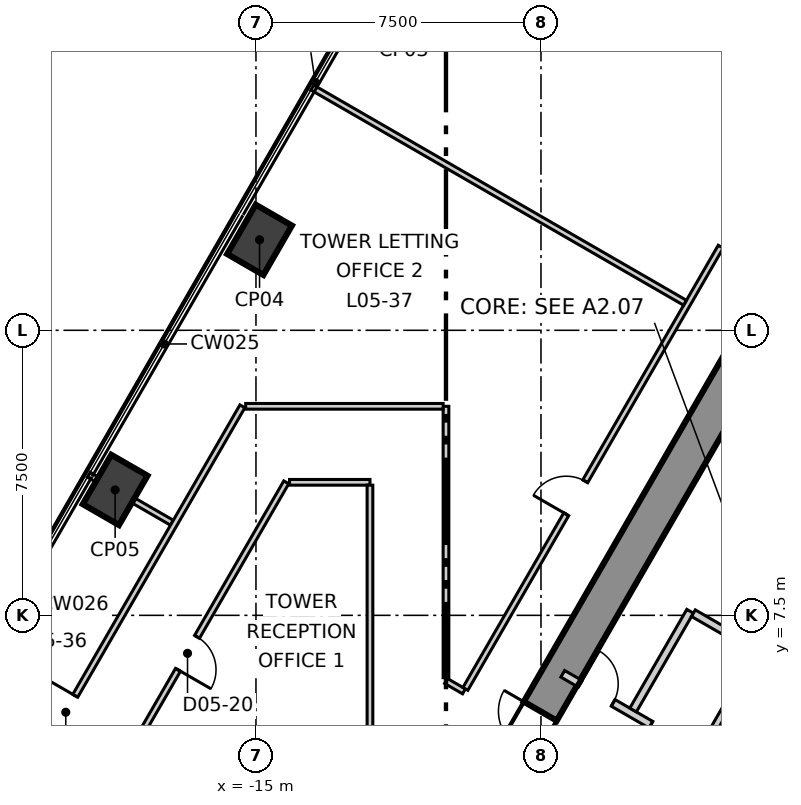
"""IFC4 building model, lengths in metres.
Left out: names, types, materials, properties, quantities, classifications, styles, units other than length and angle.
Written with IfcOpenShell. Run it as: python <this file> out.ifc"""

import sys

from ifc_helpers import new_model, si_unit, direction, frame, frame_2d, origin, origin_2d, place, context, subcontext, project, spatial, polyline, rectangle, outline, extrude, element, fill, save


model = new_model("IFC4")
c1 = context("Model", 3, precision=1e-05, world=origin(), true_north=direction((0.0, 1.0)))
c2 = subcontext(c1, "Body", "Model", "MODEL_VIEW")
j1 = project(units=[si_unit("LENGTHUNIT", "METRE"), si_unit("PLANEANGLEUNIT", "RADIAN")], contexts=[c1])
p1 = place(None, origin())
s1 = spatial("IfcSite", under=j1, at=p1, CompositionType="ELEMENT")
p2 = place(p1, origin())
s2 = spatial("IfcBuilding", under=s1, at=p2, CompositionType="ELEMENT")
p3 = place(p2, frame((0.0, 0.0, 30.3)))
s3 = spatial("IfcBuildingStorey", under=s2, at=p3, CompositionType="ELEMENT", Elevation=30.3)
p4 = place(p3, frame((-1.617, 15.2, -0.4), z_axis=(0.0, 0.0, 1.0), x_axis=(-0.499992141631, -0.866029940768, 0.0)))
e1 = element("IfcWall", 1, at=p4, inside=s3, PredefinedType="SHEAR", context=c2, shape_type="SweptSolid", body=[
    extrude(outline(polyline([(-0.289, -0.499), (1.656, -0.499), (3.601, -0.499), (5.547, -0.499), (7.492, -0.499), (9.437, -0.5), (11.382, -0.5), (13.328, -0.5), (15.273, -0.5), (17.218, -0.5), (19.163, -0.5), (21.109, -0.5), (23.054, -0.5), (24.999, -0.5), (24.422, 0.5), (22.566, 0.5), (20.709, 0.5), (18.853, 0.5), (16.997, 0.5), (15.14, 0.5), (13.284, 0.5), (11.427, 0.5), (9.571, 0.5), (7.715, 0.5), (5.858, 0.5), (4.002, 0.5), (2.146, 0.5), (0.289, 0.5), (-0.289, -0.499)])), origin(), (0.0, 0.0, 1.0), 5.1),
])
p5 = place(p4, frame((11.805, 0.0, 0.4)))
e2 = element("IfcOpeningElement", 2, at=p5, cuts=e1, PredefinedType="OPENING", context=c2, shape_type="SweptSolid", body=[
    extrude(rectangle(XDim=1.1, YDim=2.1, at=frame_2d((0.55, 1.05))), frame((0.0, 0.51, 0.0), z_axis=(0.0, -1.0, 0.0), x_axis=(1.0, 0.0, 0.0)), (0.0, 0.0, 1.0), 1.02),
])
for number, where, z_axis, x_axis in (
    (3, (-14.906, 17.381, -0.4), (0.0, 0.0, 1.0), (0.5, 0.866, 0.0)),
    (4, (-18.706, 10.8, -0.4), (0.0, 0.0, 1.0), (0.5, 0.866, 0.0)),
):
    element("IfcColumn", number, at=place(p3, frame(where, z_axis=z_axis, x_axis=x_axis)), inside=s3, PredefinedType="COLUMN", context=c2, shape_type="SweptSolid", body=[
        extrude(rectangle(XDim=1.5, YDim=1.1, at=origin_2d()), origin(), (0.0, 0.0, 1.0), 5.1),
    ])
p6 = place(p3, frame((-19.399, 11.2, 0.0), z_axis=(0.0, 0.0, 1.0), x_axis=(0.865979509711, -0.500079482444, 0.0)))
e5 = element("IfcWall", 5, at=p6, inside=s3, PredefinedType="PARTITIONING", context=c2, shape_type="SweptSolid", body=[
    extrude(rectangle(XDim=2.525, YDim=0.15, at=frame_2d((1.263, 0.0))), origin(), (0.0, 0.0, 1.0), 4.2),
])
p7 = place(p3, frame((-10.0, 5.773, 0.0), z_axis=(0.0, 0.0, 1.0), x_axis=(0.866645846342, -0.498923818852, 0.0)))
e6 = element("IfcWall", 6, at=p7, inside=s3, PredefinedType="PARTITIONING", context=c2, shape_type="SweptSolid", body=[
    extrude(rectangle(XDim=0.547, YDim=0.15, at=frame_2d((0.273, 0.0))), origin(), (0.0, 0.0, 1.0), 4.2),
])
p8 = place(p3, frame((-22.863, 0.0, 0.0), z_axis=(0.0, 0.0, 1.0), x_axis=(0.500027479704, 0.866009537788, 0.0)))
e7 = element("IfcWall", 7, at=p8, inside=s3, PredefinedType="PARTITIONING", context=c2, shape_type="SweptSolid", body=[
    extrude(rectangle(XDim=15.011, YDim=0.15, at=frame_2d((7.506, 0.0))), origin(), (0.0, 0.0, 1.0), 4.7),
])
p9 = place(p8, frame((5.216, 0.0, 0.0)))
e8 = element("IfcOpeningElement", 8, at=p9, cuts=e7, PredefinedType="OPENING", context=c2, shape_type="SweptSolid", body=[
    extrude(rectangle(XDim=1.0, YDim=2.1, at=frame_2d((0.5, 1.05))), frame((0.0, 0.085, 0.0), z_axis=(0.0, -1.0, 0.0), x_axis=(1.0, 0.0, 0.0)), (0.0, 0.0, 1.0), 0.17),
])
p10 = place(p3, frame((-9.489, 5.565, 0.0), z_axis=(0.0, 0.0, 1.0), x_axis=(0.500030231307, 0.866007949028, 0.0)))
e9 = element("IfcWall", 9, at=p10, inside=s3, PredefinedType="PARTITIONING", context=c2, shape_type="SweptSolid", body=[
    extrude(rectangle(XDim=13.435, YDim=0.15, at=frame_2d((6.718, 0.0))), origin(), (0.0, 0.0, 1.0), 4.7),
])
p11 = place(p10, frame((5.307, 0.0, 0.0)))
e10 = element("IfcOpeningElement", 10, at=p11, cuts=e9, PredefinedType="OPENING", context=c2, shape_type="SweptSolid", body=[
    extrude(rectangle(XDim=1.0, YDim=2.1, at=frame_2d((0.5, 1.05))), frame((0.0, 0.085, 0.0), z_axis=(0.0, -1.0, 0.0), x_axis=(1.0, 0.0, 0.0)), (0.0, 0.0, 1.0), 0.17),
])
p12 = place(p3, frame((-10.0, 5.86, 0.0), z_axis=(0.0, 0.0, 1.0), x_axis=(0.0, 1.0, 0.0)))
e11 = element("IfcWall", 11, at=p12, inside=s3, PredefinedType="PARTITIONING", context=c2, shape_type="SweptSolid", body=[
    extrude(rectangle(XDim=7.14, YDim=0.15, at=frame_2d((3.57, 0.0))), origin(), (0.0, 0.0, 1.0), 4.7),
])
p13 = place(p3, frame((-15.271, 13.0, 0.0), z_axis=(0.0, 0.0, 1.0), x_axis=(1.0, 0.0, 0.0)))
e12 = element("IfcWall", 12, at=p13, inside=s3, PredefinedType="PARTITIONING", context=c2, shape_type="SweptSolid", body=[
    extrude(rectangle(XDim=5.196, YDim=0.15, at=frame_2d((2.598, 0.0))), origin(), (0.0, 0.0, 1.0), 4.7),
])
p14 = place(p3, frame((-13.517, 21.387, 0.0), z_axis=(0.0, 0.0, 1.0), x_axis=(0.866036235619, -0.499981238243, 0.0)))
e13 = element("IfcWall", 13, at=p14, inside=s3, PredefinedType="PARTITIONING", context=c2, shape_type="SweptSolid", body=[
    extrude(rectangle(XDim=11.324, YDim=0.15, at=frame_2d((5.662, 0.0))), origin(), (0.0, 0.0, 1.0), 4.7),
])
p15 = place(p3, frame((-7.635, 31.575, 0.0), z_axis=(0.0, 0.0, 1.0), x_axis=(0.866010527476, -0.500025765638, 0.0)))
e14 = element("IfcWall", 14, at=p15, inside=s3, PredefinedType="PARTITIONING", context=c2, shape_type="SweptSolid", body=[
    extrude(rectangle(XDim=18.673, YDim=0.15, at=frame_2d((9.336, 0.0))), origin(), (0.0, 0.0, 1.0), 4.7),
])
p16 = place(p3, frame((-19.356, 2.075, 0.0), z_axis=(0.0, 0.0, 1.0), x_axis=(0.500014323953, 0.866017133688, 0.0)))
e15 = element("IfcWall", 15, at=p16, inside=s3, PredefinedType="PARTITIONING", context=c2, shape_type="SweptSolid", body=[
    extrude(rectangle(XDim=10.306, YDim=0.15, at=frame_2d((5.153, 0.0))), origin(), (0.0, 0.0, 1.0), 4.7),
])
p17 = place(p16, frame((4.61, 0.0, 0.0)))
e16 = element("IfcOpeningElement", 16, at=p17, cuts=e15, PredefinedType="OPENING", context=c2, shape_type="SweptSolid", body=[
    extrude(rectangle(XDim=1.0, YDim=2.1, at=frame_2d((0.5, 1.05))), frame((0.0, 0.085, 0.0), z_axis=(0.0, -1.0, 0.0), x_axis=(1.0, 0.0, 0.0)), (0.0, 0.0, 1.0), 0.17),
])
p18 = place(p3, frame((-14.116, 11.0, 0.0), z_axis=(0.0, 0.0, 1.0), x_axis=(1.0, 0.0, 0.0)))
e17 = element("IfcWall", 17, at=p18, inside=s3, PredefinedType="PARTITIONING", context=c2, shape_type="SweptSolid", body=[
    extrude(rectangle(XDim=2.116, YDim=0.15, at=frame_2d((1.058, 0.0))), origin(), (0.0, 0.0, 1.0), 4.7),
])
p19 = place(p3, frame((-12.0, 3.765, 0.0), z_axis=(0.0, 0.0, 1.0), x_axis=(0.0, 1.0, 0.0)))
e18 = element("IfcWall", 18, at=p19, inside=s3, PredefinedType="PARTITIONING", context=c2, shape_type="SweptSolid", body=[
    extrude(rectangle(XDim=7.16, YDim=0.15, at=frame_2d((3.58, 0.0))), origin(), (0.0, 0.0, 1.0), 4.7),
])
p20 = place(p3, frame((-6.927, 5.962, 0.0), z_axis=(0.0, 0.0, 1.0), x_axis=(0.866065051207, -0.49993132236, 0.0)))
e19 = element("IfcWall", 19, at=p20, inside=s3, PredefinedType="SOLIDWALL", context=c2, shape_type="SweptSolid", body=[
    extrude(rectangle(XDim=4.182, YDim=0.2, at=frame_2d((2.091, 0.0))), origin(), (0.0, 0.0, 1.0), 4.7),
])
p21 = place(p20, frame((2.68, 0.0, 0.0)))
e20 = element("IfcOpeningElement", 20, at=p21, cuts=e19, PredefinedType="OPENING", context=c2, shape_type="SweptSolid", body=[
    extrude(rectangle(XDim=0.9, YDim=2.1, at=frame_2d((0.45, 1.05))), frame((0.0, 0.11, 0.0), z_axis=(0.0, -1.0, 0.0), x_axis=(1.0, 0.0, 0.0)), (0.0, 0.0, 1.0), 0.22),
])
p22 = place(p20, frame((0.53, 0.0, 0.0)))
e21 = element("IfcOpeningElement", 21, at=p22, cuts=e19, PredefinedType="OPENING", context=c2, shape_type="SweptSolid", body=[
    extrude(rectangle(XDim=1.0, YDim=2.1, at=frame_2d((0.5, 1.05))), frame((0.0, 0.11, 0.0), z_axis=(0.0, -1.0, 0.0), x_axis=(1.0, 0.0, 0.0)), (0.0, 0.0, 1.0), 0.22),
])
p23 = place(p3, frame((-5.076, 5.009, 0.0), z_axis=(0.0, 0.0, 1.0), x_axis=(0.50002537861, 0.866010750942, 0.0)))
e22 = element("IfcWall", 22, at=p23, inside=s3, PredefinedType="SOLIDWALL", context=c2, shape_type="SweptSolid", body=[
    extrude(rectangle(XDim=3.0, YDim=0.2, at=frame_2d((1.5, 0.0))), origin(), (0.0, 0.0, 1.0), 4.7),
])
p24 = place(p3, frame((-3.489, 7.557, 0.0), z_axis=(0.0, 0.0, 1.0), x_axis=(0.866010750942, -0.50002537861, 0.0)))
e23 = element("IfcWall", 23, at=p24, inside=s3, PredefinedType="SOLIDWALL", context=c2, shape_type="SweptSolid", body=[
    extrude(rectangle(XDim=2.0, YDim=0.2, at=frame_2d((1.0, 0.0))), origin(), (0.0, 0.0, 1.0), 4.7),
])
p25 = place(p3, frame((-3.257, 3.959, 0.0), z_axis=(0.0, 0.0, 1.0), x_axis=(0.50012328804, 0.865954211699, 0.0)))
e24 = element("IfcWall", 24, at=p25, inside=s3, PredefinedType="SOLIDWALL", context=c2, shape_type="SweptSolid", body=[
    extrude(rectangle(XDim=2.9, YDim=0.2, at=frame_2d((1.45, 0.0))), origin(), (0.0, 0.0, 1.0), 4.7),
])
p26 = place(p21, origin())
e25 = element("IfcDoor", 25, at=p26, inside=s3, OperationType="SINGLE_SWING_LEFT", PredefinedType="DOOR", context=c2, shape_type="SweptSolid", body=[
    extrude(rectangle(XDim=0.9, YDim=2.1, at=frame_2d((0.45, 1.05))), frame((0.0, 0.025, 0.0), z_axis=(0.0, -1.0, 0.0), x_axis=(1.0, 0.0, 0.0)), (0.0, 0.0, 1.0), 0.05),
])
fill(e20, e25)
p27 = place(p17, origin())
e26 = element("IfcDoor", 26, at=p27, inside=s3, OperationType="SINGLE_SWING_LEFT", PredefinedType="DOOR", context=c2, shape_type="SweptSolid", body=[
    extrude(rectangle(XDim=1.0, YDim=2.1, at=frame_2d((0.5, 1.05))), frame((0.0, 0.025, 0.0), z_axis=(0.0, -1.0, 0.0), x_axis=(1.0, 0.0, 0.0)), (0.0, 0.0, 1.0), 0.05),
])
fill(e16, e26)
p28 = place(p9, origin())
e27 = element("IfcDoor", 27, at=p28, inside=s3, OperationType="SINGLE_SWING_LEFT", PredefinedType="DOOR", context=c2, shape_type="SweptSolid", body=[
    extrude(rectangle(XDim=1.0, YDim=2.1, at=frame_2d((0.5, 1.05))), frame((0.0, 0.025, 0.0), z_axis=(0.0, -1.0, 0.0), x_axis=(1.0, 0.0, 0.0)), (0.0, 0.0, 1.0), 0.05),
])
fill(e8, e27)
p29 = place(p11, origin())
e28 = element("IfcDoor", 28, at=p29, inside=s3, OperationType="SINGLE_SWING_RIGHT", PredefinedType="DOOR", context=c2, shape_type="SweptSolid", body=[
    extrude(rectangle(XDim=1.0, YDim=2.1, at=frame_2d((0.5, 1.05))), frame((0.0, 0.025, 0.0), z_axis=(0.0, -1.0, 0.0), x_axis=(1.0, 0.0, 0.0)), (0.0, 0.0, 1.0), 0.05),
])
fill(e10, e28)
p30 = place(p5, origin())
e29 = element("IfcDoor", 29, at=p30, inside=s3, OperationType="SINGLE_SWING_LEFT", PredefinedType="DOOR", context=c2, shape_type="SweptSolid", body=[
    extrude(rectangle(XDim=1.1, YDim=2.1, at=frame_2d((0.55, 1.05))), frame((0.0, 0.025, 0.0), z_axis=(0.0, -1.0, 0.0), x_axis=(1.0, 0.0, 0.0)), (0.0, 0.0, 1.0), 0.05),
])
fill(e2, e29)
p31 = place(p22, origin())
e30 = element("IfcDoor", 30, at=p31, inside=s3, OperationType="SINGLE_SWING_RIGHT", PredefinedType="DOOR", context=c2, shape_type="SweptSolid", body=[
    extrude(rectangle(XDim=1.0, YDim=2.1, at=frame_2d((0.5, 1.05))), frame((0.0, 0.025, 0.0), z_axis=(0.0, -1.0, 0.0), x_axis=(1.0, 0.0, 0.0)), (0.0, 0.0, 1.0), 0.05),
])
fill(e21, e30)
save(model, sys.argv[1])
